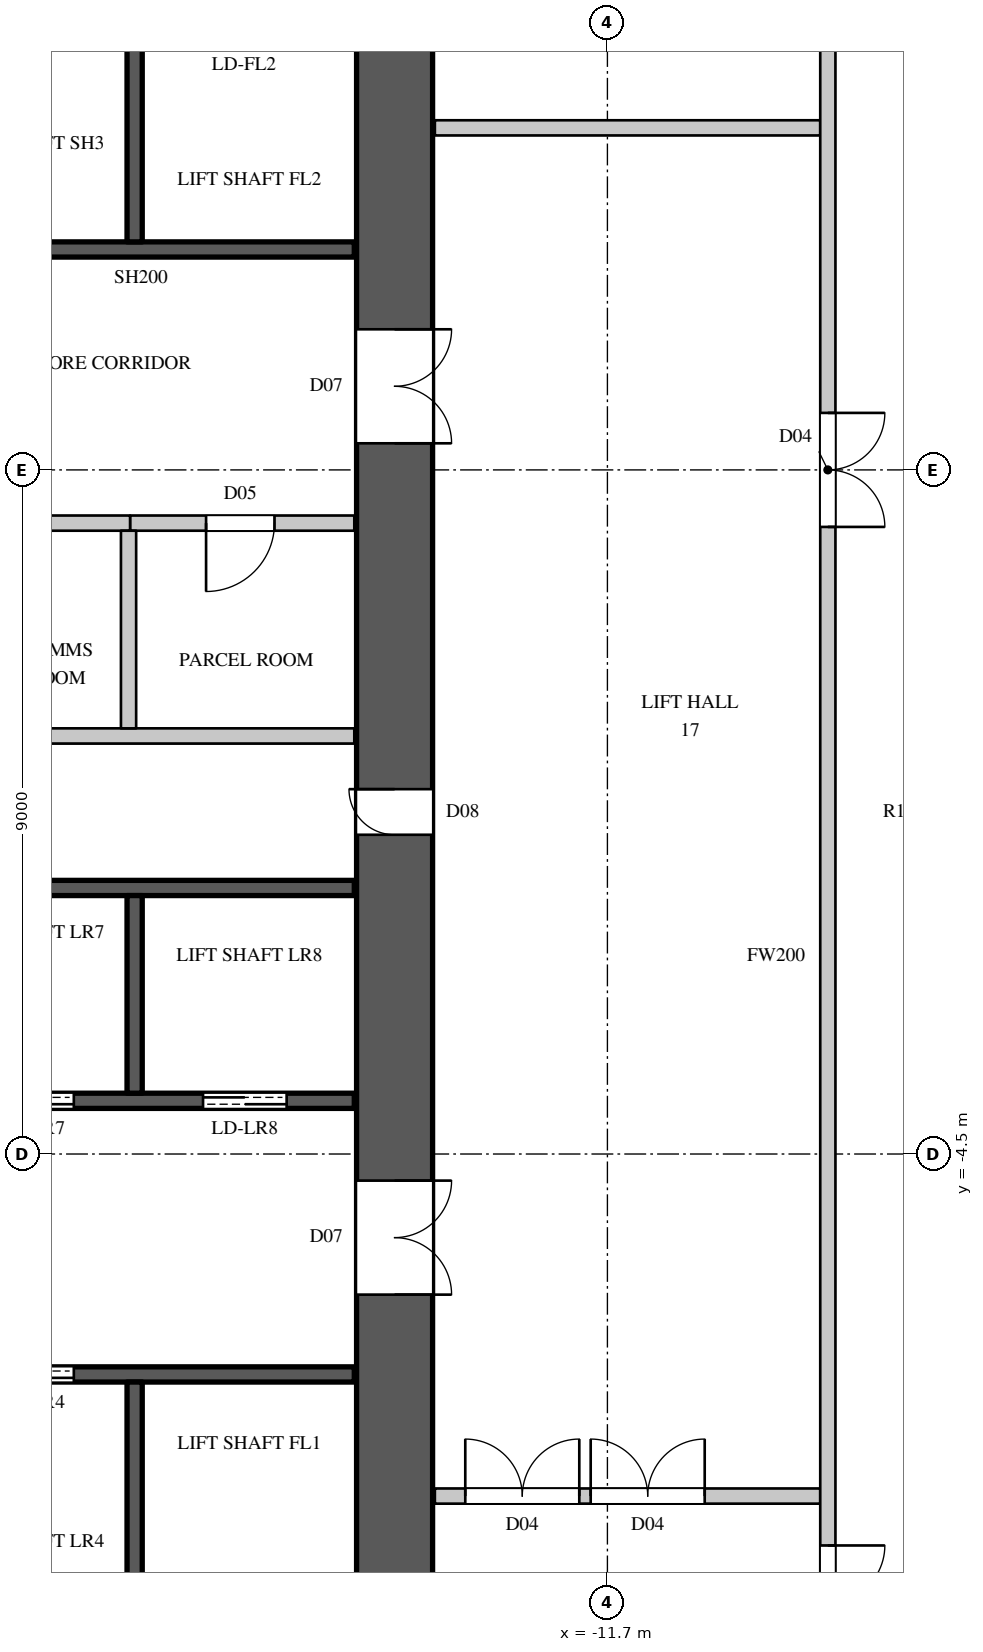
"""IFC4 building model, lengths in metres.
Left out: names, types, materials, properties, quantities, classifications, styles, units other than length and angle.
Written with IfcOpenShell. Run it as: python <this file> out.ifc"""

import sys

from ifc_helpers import new_model, si_unit, direction, frame, frame_2d, origin, place, context, subcontext, project, spatial, rectangle, extrude, element, fill, save


model = new_model("IFC4")
c1 = context("Model", 3, precision=1e-05, world=origin(), true_north=direction((0.0, 1.0)))
c2 = subcontext(c1, "Body", "Model", "MODEL_VIEW")
j1 = project(units=[si_unit("LENGTHUNIT", "METRE"), si_unit("PLANEANGLEUNIT", "RADIAN")], contexts=[c1])
p1 = place(None, origin())
s1 = spatial("IfcSite", under=j1, at=p1, CompositionType="ELEMENT")
p2 = place(p1, origin())
s2 = spatial("IfcBuilding", under=s1, at=p2, CompositionType="ELEMENT")
p3 = place(p2, frame((0.0, 0.0, 91.5)))
s3 = spatial("IfcBuildingStorey", under=s2, at=p3, CompositionType="ELEMENT", Elevation=91.5)
p4 = place(p3, frame((-14.5, -14.8, 0.0), z_axis=(0.0, 0.0, 1.0), x_axis=(0.0, 1.0, 0.0)))
e1 = element("IfcWall", 1, at=p4, inside=s3, PredefinedType="SHEAR", context=c2, shape_type="SweptSolid", body=[
    extrude(rectangle(XDim=29.6, YDim=1.0, at=frame_2d((14.8, 0.0))), origin(), (0.0, 0.0, 1.0), 3.6),
])
p5 = place(p4, frame((8.45, 0.0, 0.0)))
e2 = element("IfcOpeningElement", 2, at=p5, cuts=e1, PredefinedType="OPENING", context=c2, shape_type="SweptSolid", body=[
    extrude(rectangle(XDim=1.5, YDim=2.4, at=frame_2d((0.75, 1.2))), frame((0.0, 0.51, 0.0), z_axis=(0.0, -1.0, 0.0), x_axis=(1.0, 0.0, 0.0)), (0.0, 0.0, 1.0), 1.02),
])
p6 = place(p4, frame((19.65, 0.0, 0.0)))
e3 = element("IfcOpeningElement", 3, at=p6, cuts=e1, PredefinedType="OPENING", context=c2, shape_type="SweptSolid", body=[
    extrude(rectangle(XDim=1.5, YDim=2.4, at=frame_2d((0.75, 1.2))), frame((0.0, 0.51, 0.0), z_axis=(0.0, -1.0, 0.0), x_axis=(1.0, 0.0, 0.0)), (0.0, 0.0, 1.0), 1.02),
])
p7 = place(p4, frame((14.5, 0.0, 0.0)))
e4 = element("IfcOpeningElement", 4, at=p7, cuts=e1, PredefinedType="OPENING", context=c2, shape_type="SweptSolid", body=[
    extrude(rectangle(XDim=0.6, YDim=2.0, at=frame_2d((0.3, 1.0))), frame((0.0, 0.51, 0.0), z_axis=(0.0, -1.0, 0.0), x_axis=(1.0, 0.0, 0.0)), (0.0, 0.0, 1.0), 1.02),
])
p8 = place(p3, frame((-17.98, 3.8, 0.0), z_axis=(0.0, 0.0, 1.0), x_axis=(1.0, 0.0, 0.0)))
e5 = element("IfcWall", 5, at=p8, inside=s3, PredefinedType="PARTITIONING", context=c2, shape_type="SweptSolid", body=[
    extrude(rectangle(XDim=2.95, YDim=0.2, at=frame_2d((1.475, 0.0))), origin(), (0.0, 0.0, 1.0), 3.3),
])
p9 = place(p8, frame((1.0, 0.0, 0.0)))
e6 = element("IfcOpeningElement", 6, at=p9, cuts=e5, PredefinedType="OPENING", context=c2, shape_type="SweptSolid", body=[
    extrude(rectangle(XDim=0.9, YDim=2.2, at=frame_2d((0.45, 1.1))), frame((0.0, 0.11, 0.0), z_axis=(0.0, -1.0, 0.0), x_axis=(1.0, 0.0, 0.0)), (0.0, 0.0, 1.0), 0.22),
])
p10 = place(p3, frame((-13.97, -9.0, 0.0), z_axis=(0.0, 0.0, 1.0), x_axis=(1.0, 0.0, 0.0)))
e7 = element("IfcWall", 7, at=p10, inside=s3, PredefinedType="PARTITIONING", context=c2, shape_type="SweptSolid", body=[
    extrude(rectangle(XDim=5.07, YDim=0.2, at=frame_2d((2.535, 0.0))), origin(), (0.0, 0.0, 1.0), 3.3),
])
p11 = place(p10, frame((0.4, 0.0, 0.0)))
e8 = element("IfcOpeningElement", 8, at=p11, cuts=e7, PredefinedType="OPENING", context=c2, shape_type="SweptSolid", body=[
    extrude(rectangle(XDim=1.5, YDim=2.2, at=frame_2d((0.75, 1.1))), frame((0.0, 0.11, 0.0), z_axis=(0.0, -1.0, 0.0), x_axis=(1.0, 0.0, 0.0)), (0.0, 0.0, 1.0), 0.22),
])
p12 = place(p10, frame((2.05, 0.0, 0.0)))
e9 = element("IfcOpeningElement", 9, at=p12, cuts=e7, PredefinedType="OPENING", context=c2, shape_type="SweptSolid", body=[
    extrude(rectangle(XDim=1.5, YDim=2.2, at=frame_2d((0.75, 1.1))), frame((0.0, 0.11, 0.0), z_axis=(0.0, -1.0, 0.0), x_axis=(1.0, 0.0, 0.0)), (0.0, 0.0, 1.0), 0.22),
])
p13 = place(p3, frame((-13.97, 9.0, 0.0), z_axis=(0.0, 0.0, 1.0), x_axis=(1.0, 0.0, 0.0)))
e10 = element("IfcWall", 10, at=p13, inside=s3, PredefinedType="PARTITIONING", context=c2, shape_type="SweptSolid", body=[
    extrude(rectangle(XDim=5.07, YDim=0.2, at=frame_2d((2.535, 0.0))), origin(), (0.0, 0.0, 1.0), 3.3),
])
p14 = place(p3, frame((-8.8, -15.5, 0.0), z_axis=(0.0, 0.0, 1.0), x_axis=(0.0, 1.0, 0.0)))
e11 = element("IfcWall", 11, at=p14, inside=s3, PredefinedType="PARTITIONING", context=c2, shape_type="SweptSolid", body=[
    extrude(rectangle(XDim=27.2, YDim=0.2, at=frame_2d((13.6, 0.0))), origin(), (0.0, 0.0, 1.0), 3.3),
])
p15 = place(p14, frame((19.25, 0.0, 0.0)))
e12 = element("IfcOpeningElement", 12, at=p15, cuts=e11, PredefinedType="OPENING", context=c2, shape_type="SweptSolid", body=[
    extrude(rectangle(XDim=1.5, YDim=2.2, at=frame_2d((0.75, 1.1))), frame((0.0, 0.11, 0.0), z_axis=(0.0, -1.0, 0.0), x_axis=(1.0, 0.0, 0.0)), (0.0, 0.0, 1.0), 0.22),
])
p16 = place(p14, frame((4.35, 0.0, 0.0)))
e13 = element("IfcOpeningElement", 13, at=p16, cuts=e11, PredefinedType="OPENING", context=c2, shape_type="SweptSolid", body=[
    extrude(rectangle(XDim=1.5, YDim=2.2, at=frame_2d((0.75, 1.1))), frame((0.0, 0.11, 0.0), z_axis=(0.0, -1.0, 0.0), x_axis=(1.0, 0.0, 0.0)), (0.0, 0.0, 1.0), 0.22),
])
p17 = place(p14, frame((25.55, 0.0, 0.0)))
e14 = element("IfcOpeningElement", 14, at=p17, cuts=e11, PredefinedType="OPENING", context=c2, shape_type="SweptSolid", body=[
    extrude(rectangle(XDim=1.5, YDim=2.2, at=frame_2d((0.75, 1.1))), frame((0.0, 0.11, 0.0), z_axis=(0.0, -1.0, 0.0), x_axis=(1.0, 0.0, 0.0)), (0.0, 0.0, 1.0), 0.22),
])
p18 = place(p14, frame((0.15, 0.0, 0.0)))
e15 = element("IfcOpeningElement", 15, at=p18, cuts=e11, PredefinedType="OPENING", context=c2, shape_type="SweptSolid", body=[
    extrude(rectangle(XDim=0.9, YDim=2.2, at=frame_2d((0.45, 1.1))), frame((0.0, 0.11, 0.0), z_axis=(0.0, -1.0, 0.0), x_axis=(1.0, 0.0, 0.0)), (0.0, 0.0, 1.0), 0.22),
])
p19 = place(p3, frame((-26.1, 1.0, 0.0), z_axis=(0.0, 0.0, 1.0), x_axis=(1.0, 0.0, 0.0)))
e16 = element("IfcWall", 16, at=p19, inside=s3, PredefinedType="PARTITIONING", context=c2, shape_type="SweptSolid", body=[
    extrude(rectangle(XDim=11.07, YDim=0.2, at=frame_2d((5.535, 0.0))), origin(), (0.0, 0.0, 1.0), 3.3),
])
p20 = place(p3, frame((-21.78, 3.8, 0.0), z_axis=(0.0, 0.0, 1.0), x_axis=(1.0, 0.0, 0.0)))
e17 = element("IfcWall", 17, at=p20, inside=s3, PredefinedType="PARTITIONING", context=c2, shape_type="SweptSolid", body=[
    extrude(rectangle(XDim=3.8, YDim=0.2, at=frame_2d((1.9, 0.0))), origin(), (0.0, 0.0, 1.0), 3.3),
])
p21 = place(p20, frame((1.45, 0.0, 0.0)))
e18 = element("IfcOpeningElement", 18, at=p21, cuts=e17, PredefinedType="OPENING", context=c2, shape_type="SweptSolid", body=[
    extrude(rectangle(XDim=0.9, YDim=2.2, at=frame_2d((0.45, 1.1))), frame((0.0, 0.11, 0.0), z_axis=(0.0, -1.0, 0.0), x_axis=(1.0, 0.0, 0.0)), (0.0, 0.0, 1.0), 0.22),
])
p22 = place(p3, frame((-18.0, 1.1, 0.0), z_axis=(0.0, 0.0, 1.0), x_axis=(0.0, 1.0, 0.0)))
e19 = element("IfcWall", 19, at=p22, inside=s3, PredefinedType="PARTITIONING", context=c2, shape_type="SweptSolid", body=[
    extrude(rectangle(XDim=2.6, YDim=0.2, at=frame_2d((1.3, 0.0))), origin(), (0.0, 0.0, 1.0), 3.3),
])
p23 = place(p3, frame((-28.97, -7.4, 0.0), z_axis=(0.0, 0.0, 1.0), x_axis=(1.0, 0.0, 0.0)))
e20 = element("IfcWall", 20, at=p23, inside=s3, PredefinedType="SHEAR", context=c2, shape_type="SweptSolid", body=[
    extrude(rectangle(XDim=13.94, YDim=0.2, at=frame_2d((6.97, 0.0))), origin(), (0.0, 0.0, 1.0), 3.3),
])
p24 = place(p23, frame((0.9, 0.0, 0.0)))
e21 = element("IfcOpeningElement", 21, at=p24, cuts=e20, PredefinedType="OPENING", context=c2, shape_type="SweptSolid", body=[
    extrude(rectangle(XDim=1.1, YDim=2.2, at=frame_2d((0.55, 1.1))), frame((0.0, 0.11, 0.0), z_axis=(0.0, -1.0, 0.0), x_axis=(1.0, 0.0, 0.0)), (0.0, 0.0, 1.0), 0.22),
])
p25 = place(p23, frame((3.7, 0.0, 0.0)))
e22 = element("IfcOpeningElement", 22, at=p25, cuts=e20, PredefinedType="OPENING", context=c2, shape_type="SweptSolid", body=[
    extrude(rectangle(XDim=1.1, YDim=2.2, at=frame_2d((0.55, 1.1))), frame((0.0, 0.11, 0.0), z_axis=(0.0, -1.0, 0.0), x_axis=(1.0, 0.0, 0.0)), (0.0, 0.0, 1.0), 0.22),
])
p26 = place(p23, frame((6.4, 0.0, 0.0)))
e23 = element("IfcOpeningElement", 23, at=p26, cuts=e20, PredefinedType="OPENING", context=c2, shape_type="SweptSolid", body=[
    extrude(rectangle(XDim=1.1, YDim=2.2, at=frame_2d((0.55, 1.1))), frame((0.0, 0.11, 0.0), z_axis=(0.0, -1.0, 0.0), x_axis=(1.0, 0.0, 0.0)), (0.0, 0.0, 1.0), 0.22),
])
p27 = place(p23, frame((9.15, 0.0, 0.0)))
e24 = element("IfcOpeningElement", 24, at=p27, cuts=e20, PredefinedType="OPENING", context=c2, shape_type="SweptSolid", body=[
    extrude(rectangle(XDim=1.1, YDim=2.2, at=frame_2d((0.55, 1.1))), frame((0.0, 0.11, 0.0), z_axis=(0.0, -1.0, 0.0), x_axis=(1.0, 0.0, 0.0)), (0.0, 0.0, 1.0), 0.22),
])
p28 = place(p3, frame((-28.97, -3.8, 0.0), z_axis=(0.0, 0.0, 1.0), x_axis=(1.0, 0.0, 0.0)))
e25 = element("IfcWall", 25, at=p28, inside=s3, PredefinedType="SHEAR", context=c2, shape_type="SweptSolid", body=[
    extrude(rectangle(XDim=13.94, YDim=0.2, at=frame_2d((6.97, 0.0))), origin(), (0.0, 0.0, 1.0), 3.3),
])
p29 = place(p28, frame((3.7, 0.0, 0.0)))
e26 = element("IfcOpeningElement", 26, at=p29, cuts=e25, PredefinedType="OPENING", context=c2, shape_type="SweptSolid", body=[
    extrude(rectangle(XDim=1.1, YDim=2.2, at=frame_2d((0.55, 1.1))), frame((0.0, 0.11, 0.0), z_axis=(0.0, -1.0, 0.0), x_axis=(1.0, 0.0, 0.0)), (0.0, 0.0, 1.0), 0.22),
])
p30 = place(p28, frame((6.4, 0.0, 0.0)))
e27 = element("IfcOpeningElement", 27, at=p30, cuts=e25, PredefinedType="OPENING", context=c2, shape_type="SweptSolid", body=[
    extrude(rectangle(XDim=1.1, YDim=2.2, at=frame_2d((0.55, 1.1))), frame((0.0, 0.11, 0.0), z_axis=(0.0, -1.0, 0.0), x_axis=(1.0, 0.0, 0.0)), (0.0, 0.0, 1.0), 0.22),
])
p31 = place(p28, frame((9.15, 0.0, 0.0)))
e28 = element("IfcOpeningElement", 28, at=p31, cuts=e25, PredefinedType="OPENING", context=c2, shape_type="SweptSolid", body=[
    extrude(rectangle(XDim=1.1, YDim=2.2, at=frame_2d((0.55, 1.1))), frame((0.0, 0.11, 0.0), z_axis=(0.0, -1.0, 0.0), x_axis=(1.0, 0.0, 0.0)), (0.0, 0.0, 1.0), 0.22),
])
p32 = place(p28, frame((11.95, 0.0, 0.0)))
e29 = element("IfcOpeningElement", 29, at=p32, cuts=e25, PredefinedType="OPENING", context=c2, shape_type="SweptSolid", body=[
    extrude(rectangle(XDim=1.1, YDim=2.2, at=frame_2d((0.55, 1.1))), frame((0.0, 0.11, 0.0), z_axis=(0.0, -1.0, 0.0), x_axis=(1.0, 0.0, 0.0)), (0.0, 0.0, 1.0), 0.22),
])
p33 = place(p3, frame((-28.97, -1.0, 0.0), z_axis=(0.0, 0.0, 1.0), x_axis=(1.0, 0.0, 0.0)))
e30 = element("IfcWall", 30, at=p33, inside=s3, PredefinedType="SHEAR", context=c2, shape_type="SweptSolid", body=[
    extrude(rectangle(XDim=13.94, YDim=0.2, at=frame_2d((6.97, 0.0))), origin(), (0.0, 0.0, 1.0), 3.3),
])
p34 = place(p3, frame((-20.64, 7.4, 0.0), z_axis=(0.0, 0.0, 1.0), x_axis=(1.0, 0.0, 0.0)))
e31 = element("IfcWall", 31, at=p34, inside=s3, PredefinedType="SHEAR", context=c2, shape_type="SweptSolid", body=[
    extrude(rectangle(XDim=5.61, YDim=0.2, at=frame_2d((2.805, 0.0))), origin(), (0.0, 0.0, 1.0), 3.3),
])
p35 = place(p3, frame((-17.92, -10.1, 0.0), z_axis=(0.0, 0.0, 1.0), x_axis=(0.0, 1.0, 0.0)))
e32 = element("IfcWall", 32, at=p35, inside=s3, PredefinedType="SHEAR", context=c2, shape_type="SweptSolid", body=[
    extrude(rectangle(XDim=2.6, YDim=0.2, at=frame_2d((1.3, 0.0))), origin(), (0.0, 0.0, 1.0), 3.6),
])
p36 = place(p3, frame((-17.92, -3.7, 0.0), z_axis=(0.0, 0.0, 1.0), x_axis=(0.0, 1.0, 0.0)))
e33 = element("IfcWall", 33, at=p36, inside=s3, PredefinedType="SHEAR", context=c2, shape_type="SweptSolid", body=[
    extrude(rectangle(XDim=2.6, YDim=0.2, at=frame_2d((1.3, 0.0))), origin(), (0.0, 0.0, 1.0), 3.6),
])
p37 = place(p3, frame((-17.92, 7.5, 0.0), z_axis=(0.0, 0.0, 1.0), x_axis=(0.0, 1.0, 0.0)))
e34 = element("IfcWall", 34, at=p37, inside=s3, PredefinedType="SHEAR", context=c2, shape_type="SweptSolid", body=[
    extrude(rectangle(XDim=2.6, YDim=0.2, at=frame_2d((1.3, 0.0))), origin(), (0.0, 0.0, 1.0), 3.6),
])
p38 = place(p9, origin())
e35 = element("IfcDoor", 35, at=p38, inside=s3, OperationType="SINGLE_SWING_RIGHT", PredefinedType="DOOR", context=c2, shape_type="SweptSolid", body=[
    extrude(rectangle(XDim=0.9, YDim=2.2, at=frame_2d((0.45, 1.1))), frame((0.0, 0.025, 0.0), z_axis=(0.0, -1.0, 0.0), x_axis=(1.0, 0.0, 0.0)), (0.0, 0.0, 1.0), 0.05),
])
fill(e6, e35)
p39 = place(p27, origin())
e36 = element("IfcDoor", 36, at=p39, inside=s3, OperationType="DOUBLE_DOOR_SLIDING", PredefinedType="DOOR", context=c2, shape_type="SweptSolid", body=[
    extrude(rectangle(XDim=1.1, YDim=2.2, at=frame_2d((0.55, 1.1))), frame((0.0, 0.025, 0.0), z_axis=(0.0, -1.0, 0.0), x_axis=(1.0, 0.0, 0.0)), (0.0, 0.0, 1.0), 0.05),
])
fill(e24, e36)
p40 = place(p31, origin())
e37 = element("IfcDoor", 37, at=p40, inside=s3, OperationType="DOUBLE_DOOR_SLIDING", PredefinedType="DOOR", context=c2, shape_type="SweptSolid", body=[
    extrude(rectangle(XDim=1.1, YDim=2.2, at=frame_2d((0.55, 1.1))), frame((0.0, 0.025, 0.0), z_axis=(0.0, -1.0, 0.0), x_axis=(1.0, 0.0, 0.0)), (0.0, 0.0, 1.0), 0.05),
])
fill(e28, e37)
p41 = place(p32, origin())
e38 = element("IfcDoor", 38, at=p41, inside=s3, OperationType="DOUBLE_DOOR_SLIDING", PredefinedType="DOOR", context=c2, shape_type="SweptSolid", body=[
    extrude(rectangle(XDim=1.1, YDim=2.2, at=frame_2d((0.55, 1.1))), frame((0.0, 0.025, 0.0), z_axis=(0.0, -1.0, 0.0), x_axis=(1.0, 0.0, 0.0)), (0.0, 0.0, 1.0), 0.05),
])
fill(e29, e38)
p42 = place(p15, origin())
e39 = element("IfcDoor", 39, at=p42, inside=s3, OperationType="DOUBLE_DOOR_SINGLE_SWING", PredefinedType="DOOR", context=c2, shape_type="SweptSolid", body=[
    extrude(rectangle(XDim=1.5, YDim=2.2, at=frame_2d((0.75, 1.1))), frame((0.0, 0.025, 0.0), z_axis=(0.0, -1.0, 0.0), x_axis=(1.0, 0.0, 0.0)), (0.0, 0.0, 1.0), 0.05),
])
fill(e12, e39)
p43 = place(p11, origin())
e40 = element("IfcDoor", 40, at=p43, inside=s3, OperationType="DOUBLE_DOOR_SINGLE_SWING", PredefinedType="DOOR", context=c2, shape_type="SweptSolid", body=[
    extrude(rectangle(XDim=1.5, YDim=2.2, at=frame_2d((0.75, 1.1))), frame((0.0, 0.025, 0.0), z_axis=(0.0, -1.0, 0.0), x_axis=(1.0, 0.0, 0.0)), (0.0, 0.0, 1.0), 0.05),
])
fill(e8, e40)
p44 = place(p12, origin())
e41 = element("IfcDoor", 41, at=p44, inside=s3, OperationType="DOUBLE_DOOR_SINGLE_SWING", PredefinedType="DOOR", context=c2, shape_type="SweptSolid", body=[
    extrude(rectangle(XDim=1.5, YDim=2.2, at=frame_2d((0.75, 1.1))), frame((0.0, 0.025, 0.0), z_axis=(0.0, -1.0, 0.0), x_axis=(1.0, 0.0, 0.0)), (0.0, 0.0, 1.0), 0.05),
])
fill(e9, e41)
p45 = place(p16, origin())
e42 = element("IfcDoor", 42, at=p45, inside=s3, OperationType="DOUBLE_DOOR_SINGLE_SWING", PredefinedType="DOOR", context=c2, shape_type="SweptSolid", body=[
    extrude(rectangle(XDim=1.5, YDim=2.2, at=frame_2d((0.75, 1.1))), frame((0.0, 0.025, 0.0), z_axis=(0.0, -1.0, 0.0), x_axis=(1.0, 0.0, 0.0)), (0.0, 0.0, 1.0), 0.05),
])
fill(e13, e42)
p46 = place(p5, origin())
e43 = element("IfcDoor", 43, at=p46, inside=s3, OperationType="DOUBLE_DOOR_SINGLE_SWING", PredefinedType="DOOR", context=c2, shape_type="SweptSolid", body=[
    extrude(rectangle(XDim=1.5, YDim=2.4, at=frame_2d((0.75, 1.2))), frame((0.0, -0.445, 0.0), z_axis=(0.0, -1.0, 0.0), x_axis=(1.0, 0.0, 0.0)), (0.0, 0.0, 1.0), 0.05),
])
fill(e2, e43)
p47 = place(p6, origin())
e44 = element("IfcDoor", 44, at=p47, inside=s3, OperationType="DOUBLE_DOOR_SINGLE_SWING", PredefinedType="DOOR", context=c2, shape_type="SweptSolid", body=[
    extrude(rectangle(XDim=1.5, YDim=2.4, at=frame_2d((0.75, 1.2))), frame((0.0, -0.445, 0.0), z_axis=(0.0, -1.0, 0.0), x_axis=(1.0, 0.0, 0.0)), (0.0, 0.0, 1.0), 0.05),
])
fill(e3, e44)
p48 = place(p7, origin())
e45 = element("IfcDoor", 45, at=p48, inside=s3, OperationType="SINGLE_SWING_RIGHT", PredefinedType="DOOR", context=c2, shape_type="SweptSolid", body=[
    extrude(rectangle(XDim=0.6, YDim=2.0, at=frame_2d((0.3, 1.0))), frame((0.0, 0.495, 0.0), z_axis=(0.0, -1.0, 0.0), x_axis=(1.0, 0.0, 0.0)), (0.0, 0.0, 1.0), 0.05),
])
fill(e4, e45)
save(model, sys.argv[1])
